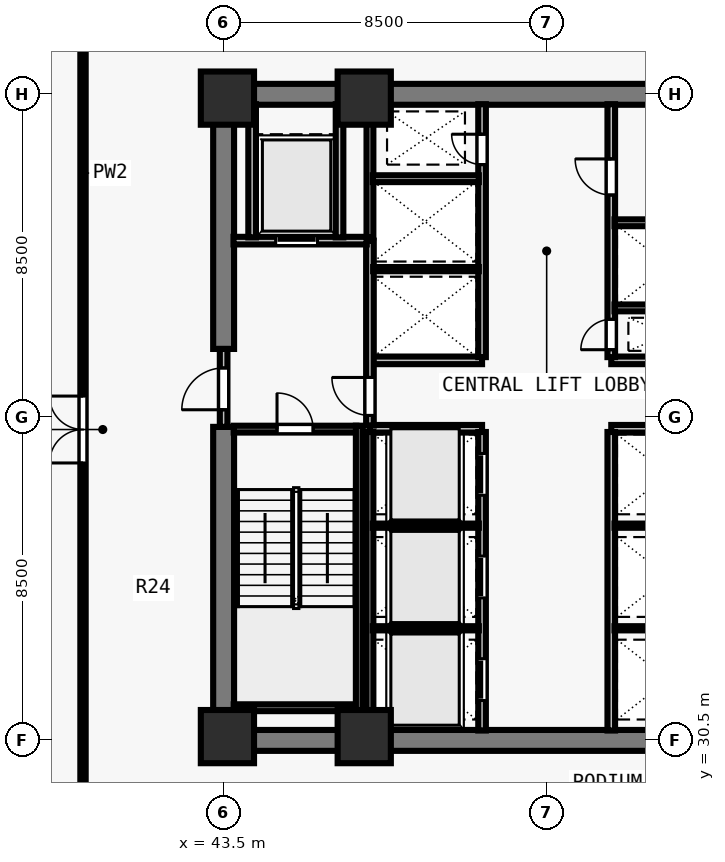
"""IFC4 building model, lengths in metres.
Left out: names, types, materials, properties, quantities, classifications, styles, units other than length and angle.
Written with IfcOpenShell. Run it as: python <this file> out.ifc"""

import sys

from ifc_helpers import new_model, si_unit, direction, frame, frame_2d, origin, origin_2d, place, context, subcontext, project, spatial, rectangle, extrude, element, fill, save


model = new_model("IFC4")
c1 = context("Model", 3, precision=1e-05, world=origin(), true_north=direction((0.0, 1.0)))
c2 = subcontext(c1, "Body", "Model", "MODEL_VIEW")
j1 = project(units=[si_unit("LENGTHUNIT", "METRE"), si_unit("PLANEANGLEUNIT", "RADIAN")], contexts=[c1])
p1 = place(None, origin())
s1 = spatial("IfcSite", under=j1, at=p1, CompositionType="ELEMENT")
p2 = place(p1, origin())
s2 = spatial("IfcBuilding", under=s1, at=p2, CompositionType="ELEMENT")
p3 = place(p2, frame((0.0, 0.0, 19.0)))
s3 = spatial("IfcBuildingStorey", under=s2, at=p3, CompositionType="ELEMENT", Elevation=19.0)
for number, where, z_axis, x_axis in (
    (1, (43.6, 30.6, 0.0), (0.0, 0.0, 1.0), (1.0, 0.0, 0.0)),
    (2, (47.2, 30.6, 0.0), (0.0, 0.0, 1.0), (1.0, 0.0, 0.0)),
    (3, (43.6, 47.4, 0.0), (0.0, 0.0, 1.0), (1.0, 0.0, 0.0)),
    (4, (47.2, 47.4, 0.0), (0.0, 0.0, 1.0), (1.0, 0.0, 0.0)),
):
    element("IfcColumn", number, at=place(p3, frame(where, z_axis=z_axis, x_axis=x_axis)), inside=s3, PredefinedType="COLUMN", context=c2, shape_type="SweptSolid", body=[
        extrude(rectangle(XDim=1.4, YDim=1.4, at=origin_2d()), origin(), (0.0, 0.0, 1.0), 4.5),
    ])
for number, where, z_axis, x_axis in (
    (5, (43.225, 30.5, 0.0), (0.0, 0.0, 1.0), (1.0, 0.0, 0.0)),
    (6, (43.225, 47.5, 0.0), (0.0, 0.0, 1.0), (1.0, 0.0, 0.0)),
):
    element("IfcWall", number, at=place(p3, frame(where, z_axis=z_axis, x_axis=x_axis)), inside=s3, PredefinedType="SHEAR", context=c2, shape_type="SweptSolid", body=[
        extrude(rectangle(XDim=17.55, YDim=0.55, at=frame_2d((8.775, 0.0))), origin(), (0.0, 0.0, 1.0), 4.28),
    ])
p4 = place(p3, frame((43.5, 30.765, 0.0), z_axis=(0.0, 0.0, 1.0), x_axis=(0.0, 1.0, 0.0)))
e7 = element("IfcWall", 7, at=p4, inside=s3, PredefinedType="SHEAR", context=c2, shape_type="SweptSolid", body=[
    extrude(rectangle(XDim=7.985, YDim=0.55, at=frame_2d((3.993, 0.0))), origin(), (0.0, 0.0, 1.0), 4.28),
])
p5 = place(p3, frame((43.5, 40.8, 0.0), z_axis=(0.0, 0.0, 1.0), x_axis=(0.0, 1.0, 0.0)))
e8 = element("IfcWall", 8, at=p5, inside=s3, PredefinedType="SHEAR", context=c2, shape_type="SweptSolid", body=[
    extrude(rectangle(XDim=6.435, YDim=0.55, at=frame_2d((3.218, 0.0))), origin(), (0.0, 0.0, 1.0), 4.28),
])
for number, where, z_axis, x_axis in (
    (9, (47.35, 38.7, 0.0), (0.0, 0.0, 1.0), (1.0, 0.0, 0.0)),
    (10, (47.35, 40.5, 0.0), (0.0, 0.0, 1.0), (1.0, 0.0, 0.0)),
    (11, (53.7, 38.7, 0.0), (0.0, 0.0, 1.0), (1.0, 0.0, 0.0)),
    (12, (53.7, 40.5, 0.0), (0.0, 0.0, 1.0), (1.0, 0.0, 0.0)),
):
    element("IfcWall", number, at=place(p3, frame(where, z_axis=z_axis, x_axis=x_axis)), inside=s3, PredefinedType="SOLIDWALL", context=c2, shape_type="SweptSolid", body=[
        extrude(rectangle(XDim=2.95, YDim=0.2, at=frame_2d((1.475, 0.0))), origin(), (0.0, 0.0, 1.0), 4.28),
    ])
p6 = place(p3, frame((50.3, 30.76, 0.0), z_axis=(0.0, 0.0, 1.0), x_axis=(0.0, 1.0, 0.0)))
e13 = element("IfcWall", 13, at=p6, inside=s3, PredefinedType="SOLIDWALL", context=c2, shape_type="SweptSolid", body=[
    extrude(rectangle(XDim=7.855, YDim=0.2, at=frame_2d((3.927, 0.0))), origin(), (0.0, 0.0, 1.0), 4.28),
])
p7 = place(p6, frame((0.79, 0.0, 0.0)))
e14 = element("IfcOpeningElement", 14, at=p7, cuts=e13, PredefinedType="OPENING", context=c2, shape_type="SweptSolid", body=[
    extrude(rectangle(XDim=1.1, YDim=2.2, at=frame_2d((0.55, 1.1))), frame((0.0, 0.11, 0.0), z_axis=(0.0, -1.0, 0.0), x_axis=(1.0, 0.0, 0.0)), (0.0, 0.0, 1.0), 0.22),
])
p8 = place(p6, frame((3.49, 0.0, 0.0)))
e15 = element("IfcOpeningElement", 15, at=p8, cuts=e13, PredefinedType="OPENING", context=c2, shape_type="SweptSolid", body=[
    extrude(rectangle(XDim=1.1, YDim=2.2, at=frame_2d((0.55, 1.1))), frame((0.0, 0.11, 0.0), z_axis=(0.0, -1.0, 0.0), x_axis=(1.0, 0.0, 0.0)), (0.0, 0.0, 1.0), 0.22),
])
p9 = place(p6, frame((6.19, 0.0, 0.0)))
e16 = element("IfcOpeningElement", 16, at=p9, cuts=e13, PredefinedType="OPENING", context=c2, shape_type="SweptSolid", body=[
    extrude(rectangle(XDim=1.1, YDim=2.2, at=frame_2d((0.55, 1.1))), frame((0.0, 0.11, 0.0), z_axis=(0.0, -1.0, 0.0), x_axis=(1.0, 0.0, 0.0)), (0.0, 0.0, 1.0), 0.22),
])
p10 = place(p3, frame((53.7, 30.76, 0.0), z_axis=(0.0, 0.0, 1.0), x_axis=(0.0, 1.0, 0.0)))
e17 = element("IfcWall", 17, at=p10, inside=s3, PredefinedType="SOLIDWALL", context=c2, shape_type="SweptSolid", body=[
    extrude(rectangle(XDim=7.855, YDim=0.2, at=frame_2d((3.927, 0.0))), origin(), (0.0, 0.0, 1.0), 4.28),
])
p11 = place(p3, frame((50.3, 40.585, 0.0), z_axis=(0.0, 0.0, 1.0), x_axis=(0.0, 1.0, 0.0)))
e18 = element("IfcWall", 18, at=p11, inside=s3, PredefinedType="SOLIDWALL", context=c2, shape_type="SweptSolid", body=[
    extrude(rectangle(XDim=6.655, YDim=0.2, at=frame_2d((3.328, 0.0))), origin(), (0.0, 0.0, 1.0), 4.28),
])
p12 = place(p11, frame((5.065, 0.0, 0.0)))
e19 = element("IfcOpeningElement", 19, at=p12, cuts=e18, PredefinedType="OPENING", context=c2, shape_type="SweptSolid", body=[
    extrude(rectangle(XDim=0.8, YDim=2.08, at=frame_2d((0.4, 1.04))), frame((0.0, 0.11, 0.0), z_axis=(0.0, -1.0, 0.0), x_axis=(1.0, 0.0, 0.0)), (0.0, 0.0, 1.0), 0.22),
])
p13 = place(p3, frame((53.7, 40.585, 0.0), z_axis=(0.0, 0.0, 1.0), x_axis=(0.0, 1.0, 0.0)))
e20 = element("IfcWall", 20, at=p13, inside=s3, PredefinedType="SOLIDWALL", context=c2, shape_type="SweptSolid", body=[
    extrude(rectangle(XDim=6.655, YDim=0.2, at=frame_2d((3.328, 0.0))), origin(), (0.0, 0.0, 1.0), 4.28),
])
p14 = place(p13, frame((0.195, 0.0, 0.0)))
e21 = element("IfcOpeningElement", 21, at=p14, cuts=e20, PredefinedType="OPENING", context=c2, shape_type="SweptSolid", body=[
    extrude(rectangle(XDim=0.8, YDim=2.08, at=frame_2d((0.4, 1.04))), frame((0.0, 0.11, 0.0), z_axis=(0.0, -1.0, 0.0), x_axis=(1.0, 0.0, 0.0)), (0.0, 0.0, 1.0), 0.22),
])
p15 = place(p13, frame((4.265, 0.0, 0.0)))
e22 = element("IfcOpeningElement", 22, at=p15, cuts=e20, PredefinedType="OPENING", context=c2, shape_type="SweptSolid", body=[
    extrude(rectangle(XDim=0.95, YDim=2.12, at=frame_2d((0.475, 1.06))), frame((0.0, 0.11, 0.0), z_axis=(0.0, -1.0, 0.0), x_axis=(1.0, 0.0, 0.0)), (0.0, 0.0, 1.0), 0.22),
])
p16 = place(p3, frame((43.5, 38.75, 0.0), z_axis=(0.0, 0.0, 1.0), x_axis=(0.0, 1.0, 0.0)))
e23 = element("IfcWall", 23, at=p16, inside=s3, PredefinedType="SOLIDWALL", context=c2, shape_type="SweptSolid", body=[
    extrude(rectangle(XDim=2.05, YDim=0.2, at=frame_2d((1.025, 0.0))), origin(), (0.0, 0.0, 1.0), 4.28),
])
p17 = place(p16, frame((0.45, 0.0, 0.0)))
e24 = element("IfcOpeningElement", 24, at=p17, cuts=e23, PredefinedType="OPENING", context=c2, shape_type="SweptSolid", body=[
    extrude(rectangle(XDim=1.1, YDim=2.15, at=frame_2d((0.55, 1.075))), frame((0.0, 0.11, 0.0), z_axis=(0.0, -1.0, 0.0), x_axis=(1.0, 0.0, 0.0)), (0.0, 0.0, 1.0), 0.22),
])
p18 = place(p3, frame((47.35, 38.785, 0.0), z_axis=(0.0, 0.0, 1.0), x_axis=(0.0, 1.0, 0.0)))
e25 = element("IfcWall", 25, at=p18, inside=s3, PredefinedType="SOLIDWALL", context=c2, shape_type="SweptSolid", body=[
    extrude(rectangle(XDim=4.865, YDim=0.2, at=frame_2d((2.433, 0.0))), origin(), (0.0, 0.0, 1.0), 4.28),
])
p19 = place(p18, frame((0.265, 0.0, 0.0)))
e26 = element("IfcOpeningElement", 26, at=p19, cuts=e25, PredefinedType="OPENING", context=c2, shape_type="SweptSolid", body=[
    extrude(rectangle(XDim=1.0, YDim=2.15, at=frame_2d((0.5, 1.075))), frame((0.0, 0.11, 0.0), z_axis=(0.0, -1.0, 0.0), x_axis=(1.0, 0.0, 0.0)), (0.0, 0.0, 1.0), 0.22),
])
p20 = place(p3, frame((43.76, 43.65, 0.0), z_axis=(0.0, 0.0, 1.0), x_axis=(1.0, 0.0, 0.0)))
e27 = element("IfcWall", 27, at=p20, inside=s3, PredefinedType="SOLIDWALL", context=c2, shape_type="SweptSolid", body=[
    extrude(rectangle(XDim=3.505, YDim=0.2, at=frame_2d((1.752, 0.0))), origin(), (0.0, 0.0, 1.0), 4.28),
])
p21 = place(p20, frame((1.11, 0.0, 0.0)))
e28 = element("IfcOpeningElement", 28, at=p21, cuts=e27, PredefinedType="OPENING", context=c2, shape_type="SweptSolid", body=[
    extrude(rectangle(XDim=1.1, YDim=2.2, at=frame_2d((0.55, 1.1))), frame((0.0, 0.11, 0.0), z_axis=(0.0, -1.0, 0.0), x_axis=(1.0, 0.0, 0.0)), (0.0, 0.0, 1.0), 0.22),
])
for number, where, z_axis, x_axis in (
    (29, (46.55, 43.735, 0.0), (0.0, 0.0, 1.0), (0.0, 1.0, 0.0)),
    (30, (44.25, 43.735, 0.0), (0.0, 0.0, 1.0), (0.0, 1.0, 0.0)),
):
    element("IfcWall", number, at=place(p3, frame(where, z_axis=z_axis, x_axis=x_axis)), inside=s3, PredefinedType="SOLIDWALL", context=c2, shape_type="SweptSolid", body=[
        extrude(rectangle(XDim=3.505, YDim=0.2, at=frame_2d((1.752, 0.0))), origin(), (0.0, 0.0, 1.0), 4.28),
    ])
p22 = place(p3, frame((47.35, 30.76, 0.0), z_axis=(0.0, 0.0, 1.0), x_axis=(0.0, 1.0, 0.0)))
e31 = element("IfcWall", 31, at=p22, inside=s3, PredefinedType="SOLIDWALL", context=c2, shape_type="SweptSolid", body=[
    extrude(rectangle(XDim=7.855, YDim=0.18, at=frame_2d((3.927, 0.0))), origin(), (0.0, 0.0, 1.0), 4.28),
])
for number, where, z_axis, x_axis in (
    (32, (47.425, 33.45, 0.0), (0.0, 0.0, 1.0), (1.0, 0.0, 0.0)),
    (33, (47.425, 36.15, 0.0), (0.0, 0.0, 1.0), (1.0, 0.0, 0.0)),
    (34, (53.785, 33.45, 0.0), (0.0, 0.0, 1.0), (1.0, 0.0, 0.0)),
    (35, (53.785, 36.15, 0.0), (0.0, 0.0, 1.0), (1.0, 0.0, 0.0)),
):
    element("IfcWall", number, at=place(p3, frame(where, z_axis=z_axis, x_axis=x_axis)), inside=s3, PredefinedType="PARTITIONING", context=c2, shape_type="SweptSolid", body=[
        extrude(rectangle(XDim=2.79, YDim=0.11, at=frame_2d((1.395, 0.0))), origin(), (0.0, 0.0, 1.0), 4.28),
    ])
p23 = place(p3, frame((47.35, 43.735, 0.0), z_axis=(0.0, 0.0, 1.0), x_axis=(0.0, 1.0, 0.0)))
e36 = element("IfcWall", 36, at=p23, inside=s3, PredefinedType="SOLIDWALL", context=c2, shape_type="SweptSolid", body=[
    extrude(rectangle(XDim=3.505, YDim=0.18, at=frame_2d((1.752, 0.0))), origin(), (0.0, 0.0, 1.0), 4.28),
])
p24 = place(p3, frame((47.435, 42.9, 0.0), z_axis=(0.0, 0.0, 1.0), x_axis=(1.0, 0.0, 0.0)))
e37 = element("IfcWall", 37, at=p24, inside=s3, PredefinedType="PARTITIONING", context=c2, shape_type="SweptSolid", body=[
    extrude(rectangle(XDim=2.78, YDim=0.11, at=frame_2d((1.39, 0.0))), origin(), (0.0, 0.0, 1.0), 4.28),
])
p25 = place(p3, frame((47.425, 45.28, 0.0), z_axis=(0.0, 0.0, 1.0), x_axis=(1.0, 0.0, 0.0)))
e38 = element("IfcWall", 38, at=p25, inside=s3, PredefinedType="SOLIDWALL", context=c2, shape_type="SweptSolid", body=[
    extrude(rectangle(XDim=2.79, YDim=0.18, at=frame_2d((1.395, 0.0))), origin(), (0.0, 0.0, 1.0), 4.28),
])
p26 = place(p3, frame((53.785, 41.88, 0.0), z_axis=(0.0, 0.0, 1.0), x_axis=(1.0, 0.0, 0.0)))
e39 = element("IfcWall", 39, at=p26, inside=s3, PredefinedType="SOLIDWALL", context=c2, shape_type="SweptSolid", body=[
    extrude(rectangle(XDim=2.78, YDim=0.18, at=frame_2d((1.39, 0.0))), origin(), (0.0, 0.0, 1.0), 4.28),
])
p27 = place(p3, frame((53.785, 44.12, 0.0), z_axis=(0.0, 0.0, 1.0), x_axis=(1.0, 0.0, 0.0)))
e40 = element("IfcWall", 40, at=p27, inside=s3, PredefinedType="SOLIDWALL", context=c2, shape_type="SweptSolid", body=[
    extrude(rectangle(XDim=2.79, YDim=0.18, at=frame_2d((1.395, 0.0))), origin(), (0.0, 0.0, 1.0), 4.28),
])
p28 = place(p3, frame((39.8, 26.855, 0.0), z_axis=(0.0, 0.0, 1.0), x_axis=(0.0, 1.0, 0.0)))
e41 = element("IfcWall", 41, at=p28, inside=s3, PredefinedType="PARTITIONING", context=c2, shape_type="SweptSolid", body=[
    extrude(rectangle(XDim=24.29, YDim=0.14, at=frame_2d((12.145, 0.0))), origin(), (0.0, 0.0, 1.0), 4.28),
])
p29 = place(p28, frame((10.945, 0.0, 0.0)))
e42 = element("IfcOpeningElement", 42, at=p29, cuts=e41, PredefinedType="OPENING", context=c2, shape_type="SweptSolid", body=[
    extrude(rectangle(XDim=1.76, YDim=2.2, at=frame_2d((0.88, 1.1))), frame((0.0, 0.08, 0.0), z_axis=(0.0, -1.0, 0.0), x_axis=(1.0, 0.0, 0.0)), (0.0, 0.0, 1.0), 0.16),
])
p30 = place(p3, frame((43.765, 38.69, 0.0), z_axis=(0.0, 0.0, 1.0), x_axis=(1.0, 0.0, 0.0)))
e43 = element("IfcWall", 43, at=p30, inside=s3, PredefinedType="SOLIDWALL", context=c2, shape_type="SweptSolid", body=[
    extrude(rectangle(XDim=3.23, YDim=0.18, at=frame_2d((1.615, 0.0))), origin(), (0.0, 0.0, 1.0), 4.28),
])
p31 = place(p30, frame((1.14, 0.0, 0.0)))
e44 = element("IfcOpeningElement", 44, at=p31, cuts=e43, PredefinedType="OPENING", context=c2, shape_type="SweptSolid", body=[
    extrude(rectangle(XDim=0.95, YDim=2.15, at=frame_2d((0.475, 1.075))), frame((0.0, 0.1, 0.0), z_axis=(0.0, -1.0, 0.0), x_axis=(1.0, 0.0, 0.0)), (0.0, 0.0, 1.0), 0.2),
])
p32 = place(p3, frame((43.765, 31.36, 0.0), z_axis=(0.0, 0.0, 1.0), x_axis=(1.0, 0.0, 0.0)))
e45 = element("IfcWall", 45, at=p32, inside=s3, PredefinedType="SOLIDWALL", context=c2, shape_type="SweptSolid", body=[
    extrude(rectangle(XDim=3.23, YDim=0.18, at=frame_2d((1.615, 0.0))), origin(), (0.0, 0.0, 1.0), 4.28),
])
p33 = place(p3, frame((47.07, 38.78, 0.0), z_axis=(0.0, 0.0, 1.0), x_axis=(0.0, -1.0, 0.0)))
e46 = element("IfcWall", 46, at=p33, inside=s3, PredefinedType="SOLIDWALL", context=c2, shape_type="SweptSolid", body=[
    extrude(rectangle(XDim=8.017, YDim=0.18, at=frame_2d((4.009, 0.0))), origin(), (0.0, 0.0, 1.0), 4.28),
])
p34 = place(p17, origin())
e47 = element("IfcDoor", 47, at=p34, inside=s3, OperationType="SINGLE_SWING_LEFT", PredefinedType="DOOR", context=c2, shape_type="SweptSolid", body=[
    extrude(rectangle(XDim=1.1, YDim=2.15, at=frame_2d((0.55, 1.075))), frame((0.0, 0.025, 0.0), z_axis=(0.0, -1.0, 0.0), x_axis=(1.0, 0.0, 0.0)), (0.0, 0.0, 1.0), 0.05),
])
fill(e24, e47)
p35 = place(p19, origin())
e48 = element("IfcDoor", 48, at=p35, inside=s3, OperationType="SINGLE_SWING_RIGHT", PredefinedType="DOOR", context=c2, shape_type="SweptSolid", body=[
    extrude(rectangle(XDim=1.0, YDim=2.15, at=frame_2d((0.5, 1.075))), frame((0.0, 0.025, 0.0), z_axis=(0.0, -1.0, 0.0), x_axis=(1.0, 0.0, 0.0)), (0.0, 0.0, 1.0), 0.05),
])
fill(e26, e48)
p36 = place(p21, origin())
e49 = element("IfcDoor", 49, at=p36, inside=s3, OperationType="SLIDING_TO_LEFT", PredefinedType="DOOR", context=c2, shape_type="SweptSolid", body=[
    extrude(rectangle(XDim=1.1, YDim=2.2, at=frame_2d((0.55, 1.1))), frame((0.0, 0.025, 0.0), z_axis=(0.0, -1.0, 0.0), x_axis=(1.0, 0.0, 0.0)), (0.0, 0.0, 1.0), 0.05),
])
fill(e28, e49)
p37 = place(p7, origin())
e50 = element("IfcDoor", 50, at=p37, inside=s3, OperationType="SLIDING_TO_LEFT", PredefinedType="DOOR", context=c2, shape_type="SweptSolid", body=[
    extrude(rectangle(XDim=1.1, YDim=2.2, at=frame_2d((0.55, 1.1))), frame((0.0, 0.025, 0.0), z_axis=(0.0, -1.0, 0.0), x_axis=(1.0, 0.0, 0.0)), (0.0, 0.0, 1.0), 0.05),
])
fill(e14, e50)
p38 = place(p8, origin())
e51 = element("IfcDoor", 51, at=p38, inside=s3, OperationType="SLIDING_TO_LEFT", PredefinedType="DOOR", context=c2, shape_type="SweptSolid", body=[
    extrude(rectangle(XDim=1.1, YDim=2.2, at=frame_2d((0.55, 1.1))), frame((0.0, 0.025, 0.0), z_axis=(0.0, -1.0, 0.0), x_axis=(1.0, 0.0, 0.0)), (0.0, 0.0, 1.0), 0.05),
])
fill(e15, e51)
p39 = place(p9, origin())
e52 = element("IfcDoor", 52, at=p39, inside=s3, OperationType="SLIDING_TO_LEFT", PredefinedType="DOOR", context=c2, shape_type="SweptSolid", body=[
    extrude(rectangle(XDim=1.1, YDim=2.2, at=frame_2d((0.55, 1.1))), frame((0.0, 0.025, 0.0), z_axis=(0.0, -1.0, 0.0), x_axis=(1.0, 0.0, 0.0)), (0.0, 0.0, 1.0), 0.05),
])
fill(e16, e52)
p40 = place(p12, origin())
e53 = element("IfcDoor", 53, at=p40, inside=s3, OperationType="SINGLE_SWING_RIGHT", PredefinedType="DOOR", context=c2, shape_type="SweptSolid", body=[
    extrude(rectangle(XDim=0.8, YDim=2.08, at=frame_2d((0.4, 1.04))), frame((0.0, 0.025, 0.0), z_axis=(0.0, -1.0, 0.0), x_axis=(1.0, 0.0, 0.0)), (0.0, 0.0, 1.0), 0.05),
])
fill(e19, e53)
p41 = place(p14, origin())
e54 = element("IfcDoor", 54, at=p41, inside=s3, OperationType="SINGLE_SWING_LEFT", PredefinedType="DOOR", context=c2, shape_type="SweptSolid", body=[
    extrude(rectangle(XDim=0.8, YDim=2.08, at=frame_2d((0.4, 1.04))), frame((0.0, 0.025, 0.0), z_axis=(0.0, -1.0, 0.0), x_axis=(1.0, 0.0, 0.0)), (0.0, 0.0, 1.0), 0.05),
])
fill(e21, e54)
p42 = place(p15, origin())
e55 = element("IfcDoor", 55, at=p42, inside=s3, OperationType="SINGLE_SWING_RIGHT", PredefinedType="DOOR", context=c2, shape_type="SweptSolid", body=[
    extrude(rectangle(XDim=0.95, YDim=2.12, at=frame_2d((0.475, 1.06))), frame((0.0, 0.025, 0.0), z_axis=(0.0, -1.0, 0.0), x_axis=(1.0, 0.0, 0.0)), (0.0, 0.0, 1.0), 0.05),
])
fill(e22, e55)
p43 = place(p29, origin())
e56 = element("IfcDoor", 56, at=p43, inside=s3, OperationType="DOUBLE_DOOR_SINGLE_SWING", PredefinedType="DOOR", context=c2, shape_type="SweptSolid", body=[
    extrude(rectangle(XDim=1.76, YDim=2.2, at=frame_2d((0.88, 1.1))), frame((0.0, 0.025, 0.0), z_axis=(0.0, -1.0, 0.0), x_axis=(1.0, 0.0, 0.0)), (0.0, 0.0, 1.0), 0.05),
])
fill(e42, e56)
p44 = place(p31, origin())
e57 = element("IfcDoor", 57, at=p44, inside=s3, OperationType="SINGLE_SWING_LEFT", PredefinedType="DOOR", context=c2, shape_type="SweptSolid", body=[
    extrude(rectangle(XDim=0.95, YDim=2.15, at=frame_2d((0.475, 1.075))), frame((0.0, 0.025, 0.0), z_axis=(0.0, -1.0, 0.0), x_axis=(1.0, 0.0, 0.0)), (0.0, 0.0, 1.0), 0.05),
])
fill(e44, e57)
save(model, sys.argv[1])
